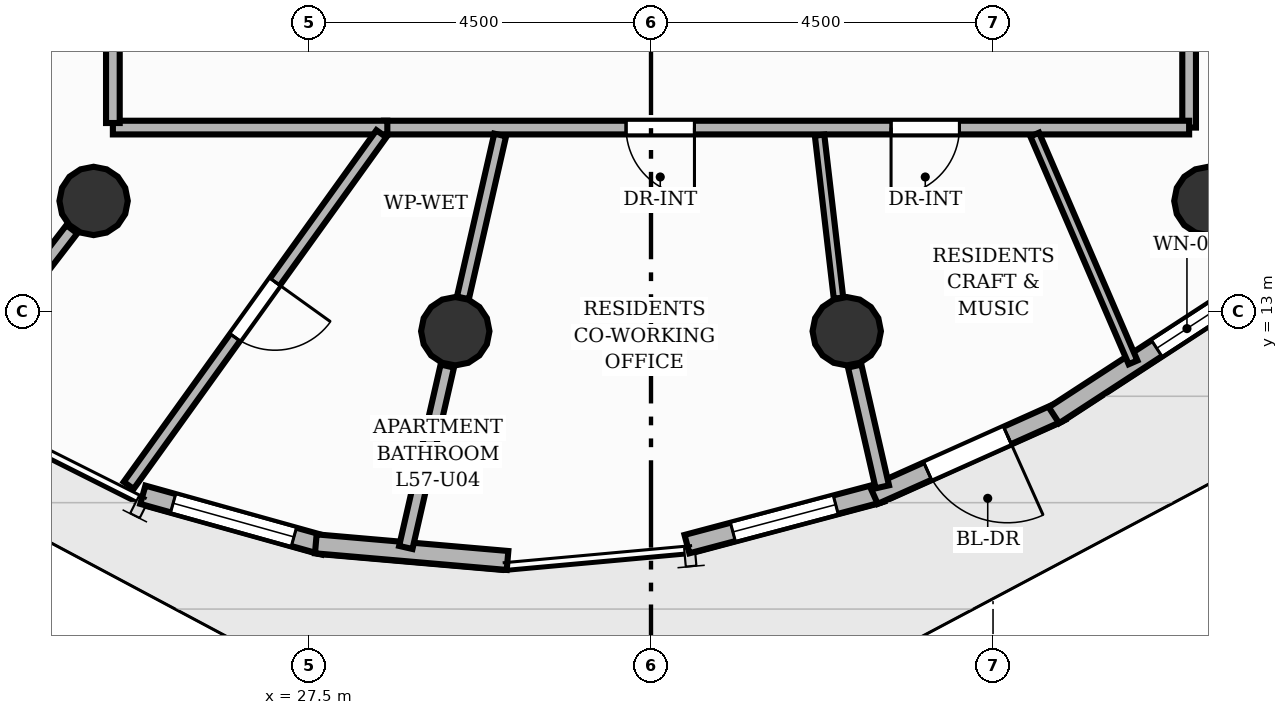
"""IFC4 building model, lengths in metres.
Left out: names, types, materials, properties, quantities, classifications, styles, units other than length and angle.
Written with IfcOpenShell. Run it as: python <this file> out.ifc"""

import sys

from ifc_helpers import new_model, si_unit, direction, frame, frame_2d, origin, origin_2d, place, context, subcontext, project, spatial, rectangle, circle, extrude, element, fill, save


model = new_model("IFC4")
c1 = context("Model", 3, precision=1e-05, world=origin(), true_north=direction((0.0, 1.0)))
c2 = subcontext(c1, "Body", "Model", "MODEL_VIEW")
j1 = project(units=[si_unit("LENGTHUNIT", "METRE"), si_unit("PLANEANGLEUNIT", "RADIAN")], contexts=[c1])
p1 = place(None, origin())
s1 = spatial("IfcSite", under=j1, at=p1, CompositionType="ELEMENT")
p2 = place(p1, origin())
s2 = spatial("IfcBuilding", under=s1, at=p2, CompositionType="ELEMENT")
p3 = place(p2, frame((0.0, 0.0, 191.84)))
s3 = spatial("IfcBuildingStorey", under=s2, at=p3, CompositionType="ELEMENT", Elevation=191.84)
for number, where, z_axis, x_axis in (
    (1, (24.667, 14.455, 0.0), (0.0, 0.0, 1.0), (1.0, 0.0, 0.0)),
    (2, (29.425, 12.74, 0.0), (0.0, 0.0, 1.0), (1.0, 0.0, 0.0)),
    (3, (34.575, 12.74, 0.0), (0.0, 0.0, 1.0), (1.0, 0.0, 0.0)),
    (4, (39.333, 14.455, 0.0), (0.0, 0.0, 1.0), (1.0, 0.0, 0.0)),
):
    element("IfcColumn", number, at=place(p3, frame(where, z_axis=z_axis, x_axis=x_axis)), inside=s3, PredefinedType="COLUMN", context=c2, shape_type="SweptSolid", body=[
        extrude(circle(Radius=0.45, at=origin_2d()), origin(), (0.0, 0.0, 1.0), 3.2),
    ])
p4 = place(p3, frame((27.701, 9.923, 0.0), z_axis=(0.0, 0.0, 1.0), x_axis=(-0.96316841201, 0.26889888454, 0.0)))
e5 = element("IfcWall", 5, at=p4, inside=s3, PredefinedType="SOLIDWALL", context=c2, shape_type="SweptSolid", body=[
    extrude(rectangle(XDim=2.478, YDim=0.25, at=frame_2d((1.239, 0.0))), origin(), (0.0, 0.0, 1.0), 2.96),
])
p5 = place(p4, frame((0.414, 0.0, 0.85)))
e6 = element("IfcOpeningElement", 6, at=p5, cuts=e5, PredefinedType="OPENING", context=c2, shape_type="SweptSolid", body=[
    extrude(rectangle(XDim=1.65, YDim=1.55, at=frame_2d((0.825, 0.775))), frame((0.0, 0.135, 0.0), z_axis=(0.0, -1.0, 0.0), x_axis=(1.0, 0.0, 0.0)), (0.0, 0.0, 1.0), 0.27),
])
p6 = place(p3, frame((30.112, 9.724, 0.0), z_axis=(0.0, 0.0, 1.0), x_axis=(-0.996260822813, 0.08639660252, 0.0)))
e7 = element("IfcWall", 7, at=p6, inside=s3, PredefinedType="SOLIDWALL", context=c2, shape_type="SweptSolid", body=[
    extrude(rectangle(XDim=2.532, YDim=0.25, at=frame_2d((1.266, 0.0))), origin(), (0.0, 0.0, 1.0), 2.96),
])
p7 = place(p3, frame((35.035, 10.619, 0.0), z_axis=(0.0, 0.0, 1.0), x_axis=(-0.96652474621, -0.256573410476, 0.0)))
e8 = element("IfcWall", 8, at=p7, inside=s3, PredefinedType="SOLIDWALL", context=c2, shape_type="SweptSolid", body=[
    extrude(rectangle(XDim=2.651, YDim=0.25, at=frame_2d((1.325, 0.0))), origin(), (0.0, 0.0, 1.0), 2.96),
])
p8 = place(p7, frame((0.626, 0.0, 0.85)))
e9 = element("IfcOpeningElement", 9, at=p8, cuts=e8, PredefinedType="OPENING", context=c2, shape_type="SweptSolid", body=[
    extrude(rectangle(XDim=1.4, YDim=1.55, at=frame_2d((0.7, 0.775))), frame((0.0, 0.135, 0.0), z_axis=(0.0, -1.0, 0.0), x_axis=(1.0, 0.0, 0.0)), (0.0, 0.0, 1.0), 0.27),
])
p9 = place(p3, frame((37.397, 11.687, 0.0), z_axis=(0.0, 0.0, 1.0), x_axis=(-0.912615139532, -0.408819773368, 0.0)))
e10 = element("IfcWall", 10, at=p9, inside=s3, PredefinedType="SOLIDWALL", context=c2, shape_type="SweptSolid", body=[
    extrude(rectangle(XDim=2.702, YDim=0.25, at=frame_2d((1.351, 0.0))), origin(), (0.0, 0.0, 1.0), 2.96),
])
p10 = place(p9, frame((0.776, 0.0, 0.0)))
e11 = element("IfcOpeningElement", 11, at=p10, cuts=e10, PredefinedType="OPENING", context=c2, shape_type="SweptSolid", body=[
    extrude(rectangle(XDim=1.15, YDim=2.2, at=frame_2d((0.575, 1.1))), frame((0.0, 0.135, 0.0), z_axis=(0.0, -1.0, 0.0), x_axis=(1.0, 0.0, 0.0)), (0.0, 0.0, 1.0), 0.27),
])
p11 = place(p3, frame((39.596, 13.13, 0.0), z_axis=(0.0, 0.0, 1.0), x_axis=(-0.837860586987, -0.545884270496, 0.0)))
e12 = element("IfcWall", 12, at=p11, inside=s3, PredefinedType="SOLIDWALL", context=c2, shape_type="SweptSolid", body=[
    extrude(rectangle(XDim=2.739, YDim=0.25, at=frame_2d((1.369, 0.0))), origin(), (0.0, 0.0, 1.0), 2.96),
])
p12 = place(p11, frame((0.175, 0.0, 0.85)))
e13 = element("IfcOpeningElement", 13, at=p12, cuts=e12, PredefinedType="OPENING", context=c2, shape_type="SweptSolid", body=[
    extrude(rectangle(XDim=0.95, YDim=1.45, at=frame_2d((0.475, 0.725))), frame((0.0, 0.135, 0.0), z_axis=(0.0, -1.0, 0.0), x_axis=(1.0, 0.0, 0.0)), (0.0, 0.0, 1.0), 0.27),
])
p13 = place(p3, frame((24.38, 14.082, 0.0), z_axis=(0.0, 0.0, 1.0), x_axis=(-0.609249164273, -0.792978849549, 0.0)))
e14 = element("IfcWall", 14, at=p13, inside=s3, PredefinedType="PARTITIONING", context=c2, shape_type="SweptSolid", body=[
    extrude(rectangle(XDim=2.557, YDim=0.18, at=frame_2d((1.278, 0.0))), origin(), (0.0, 0.0, 1.0), 2.403),
])
p14 = place(p3, frame((29.32, 12.282, 0.0), z_axis=(0.0, 0.0, 1.0), x_axis=(-0.222943921747, -0.974831271429, 0.0)))
e15 = element("IfcWall", 15, at=p14, inside=s3, PredefinedType="PARTITIONING", context=c2, shape_type="SweptSolid", body=[
    extrude(rectangle(XDim=2.448, YDim=0.18, at=frame_2d((1.224, 0.0))), origin(), (0.0, 0.0, 1.0), 2.403),
])
p15 = place(p3, frame((34.68, 12.282, 0.0), z_axis=(0.0, 0.0, 1.0), x_axis=(0.222967107114, -0.974825968645, 0.0)))
e16 = element("IfcWall", 16, at=p15, inside=s3, PredefinedType="PARTITIONING", context=c2, shape_type="SweptSolid", body=[
    extrude(rectangle(XDim=1.63, YDim=0.18, at=frame_2d((0.815, 0.0))), origin(), (0.0, 0.0, 1.0), 2.403),
])
p16 = place(p3, frame((39.08, 24.526, 0.0), z_axis=(0.0, 0.0, 1.0), x_axis=(0.0, -1.0, 0.0)))
e17 = element("IfcWall", 17, at=p16, inside=s3, PredefinedType="PARTITIONING", context=c2, shape_type="SweptSolid", body=[
    extrude(rectangle(XDim=9.106, YDim=0.18, at=frame_2d((4.553, 0.0))), origin(), (0.0, 0.0, 1.0), 2.955),
])
p17 = place(p16, frame((1.184, 0.0, 0.0)))
e18 = element("IfcOpeningElement", 18, at=p17, cuts=e17, PredefinedType="OPENING", context=c2, shape_type="SweptSolid", body=[
    extrude(rectangle(XDim=0.9, YDim=2.1, at=frame_2d((0.45, 1.05))), frame((0.0, 0.1, 0.0), z_axis=(0.0, -1.0, 0.0), x_axis=(1.0, 0.0, 0.0)), (0.0, 0.0, 1.0), 0.2),
])
p18 = place(p16, frame((5.716, 0.0, 0.0)))
e19 = element("IfcOpeningElement", 19, at=p18, cuts=e17, PredefinedType="OPENING", context=c2, shape_type="SweptSolid", body=[
    extrude(rectangle(XDim=0.9, YDim=2.1, at=frame_2d((0.45, 1.05))), frame((0.0, 0.1, 0.0), z_axis=(0.0, -1.0, 0.0), x_axis=(1.0, 0.0, 0.0)), (0.0, 0.0, 1.0), 0.2),
])
p19 = place(p3, frame((39.08, 15.42, 0.0), z_axis=(0.0, 0.0, 1.0), x_axis=(-1.0, 0.0, 0.0)))
e20 = element("IfcWall", 20, at=p19, inside=s3, PredefinedType="PARTITIONING", context=c2, shape_type="SweptSolid", body=[
    extrude(rectangle(XDim=10.594, YDim=0.18, at=frame_2d((5.297, 0.0))), origin(), (0.0, 0.0, 1.0), 2.955),
])
p20 = place(p19, frame((3.021, 0.0, 0.0)))
e21 = element("IfcOpeningElement", 21, at=p20, cuts=e20, PredefinedType="OPENING", context=c2, shape_type="SweptSolid", body=[
    extrude(rectangle(XDim=0.9, YDim=2.1, at=frame_2d((0.45, 1.05))), frame((0.0, 0.1, 0.0), z_axis=(0.0, -1.0, 0.0), x_axis=(1.0, 0.0, 0.0)), (0.0, 0.0, 1.0), 0.2),
])
p21 = place(p19, frame((6.508, 0.0, 0.0)))
e22 = element("IfcOpeningElement", 22, at=p21, cuts=e20, PredefinedType="OPENING", context=c2, shape_type="SweptSolid", body=[
    extrude(rectangle(XDim=0.9, YDim=2.1, at=frame_2d((0.45, 1.05))), frame((0.0, 0.1, 0.0), z_axis=(0.0, -1.0, 0.0), x_axis=(1.0, 0.0, 0.0)), (0.0, 0.0, 1.0), 0.2),
])
p22 = place(p3, frame((28.531, 15.42, 0.0), z_axis=(0.0, 0.0, 1.0), x_axis=(-1.0, 0.0, 0.0)))
e23 = element("IfcWall", 23, at=p22, inside=s3, PredefinedType="PARTITIONING", context=c2, shape_type="SweptSolid", body=[
    extrude(rectangle(XDim=3.611, YDim=0.18, at=frame_2d((1.805, 0.0))), origin(), (0.0, 0.0, 1.0), 2.955),
])
p23 = place(p3, frame((24.92, 15.48, 0.0), z_axis=(0.0, 0.0, 1.0), x_axis=(0.0, 1.0, 0.0)))
e24 = element("IfcWall", 24, at=p23, inside=s3, PredefinedType="PARTITIONING", context=c2, shape_type="SweptSolid", body=[
    extrude(rectangle(XDim=3.946, YDim=0.18, at=frame_2d((1.973, 0.0))), origin(), (0.0, 0.0, 1.0), 2.955),
])
p24 = place(p23, frame((1.448, 0.0, 0.0)))
e25 = element("IfcOpeningElement", 25, at=p24, cuts=e24, PredefinedType="OPENING", context=c2, shape_type="SweptSolid", body=[
    extrude(rectangle(XDim=1.05, YDim=2.15, at=frame_2d((0.525, 1.075))), frame((0.0, 0.1, 0.0), z_axis=(0.0, -1.0, 0.0), x_axis=(1.0, 0.0, 0.0)), (0.0, 0.0, 1.0), 0.2),
])
p25 = place(p3, frame((38.342, 12.331, 0.0), z_axis=(0.0, 0.0, 1.0), x_axis=(-0.396192482216, 0.918167477662, 0.0)))
e26 = element("IfcWall", 26, at=p25, inside=s3, PredefinedType="PARTITIONING", context=c2, shape_type="SweptSolid", body=[
    extrude(rectangle(XDim=3.265, YDim=0.125, at=frame_2d((1.632, 0.0))), origin(), (0.0, 0.0, 1.0), 2.692),
])
p26 = place(p3, frame((34.467, 13.176, 0.0), z_axis=(0.0, 0.0, 1.0), x_axis=(-0.115430815868, 0.993315522253, 0.0)))
e27 = element("IfcWall", 27, at=p26, inside=s3, PredefinedType="PARTITIONING", context=c2, shape_type="SweptSolid", body=[
    extrude(rectangle(XDim=2.159, YDim=0.125, at=frame_2d((1.08, 0.0))), origin(), (0.0, 0.0, 1.0), 2.403),
])
p27 = place(p3, frame((29.525, 13.179, 0.0), z_axis=(0.0, 0.0, 1.0), x_axis=(0.222969522248, 0.974825416241, 0.0)))
e28 = element("IfcWall", 28, at=p27, inside=s3, PredefinedType="PLUMBINGWALL", context=c2, shape_type="SweptSolid", body=[
    extrude(rectangle(XDim=2.199, YDim=0.16, at=frame_2d((1.099, 0.0))), origin(), (0.0, 0.0, 1.0), 2.403),
])
p28 = place(p3, frame((28.452, 15.339, 0.0), z_axis=(0.0, 0.0, 1.0), x_axis=(-0.583489481732, -0.812120695899, 0.0)))
e29 = element("IfcWall", 29, at=p28, inside=s3, PredefinedType="PLUMBINGWALL", context=c2, shape_type="SweptSolid", body=[
    extrude(rectangle(XDim=5.698, YDim=0.16, at=frame_2d((2.849, 0.0))), origin(), (0.0, 0.0, 1.0), 2.692),
])
p29 = place(p28, frame((2.399, 0.0, 0.0)))
e30 = element("IfcOpeningElement", 30, at=p29, cuts=e29, PredefinedType="OPENING", context=c2, shape_type="SweptSolid", body=[
    extrude(rectangle(XDim=0.9, YDim=2.1, at=frame_2d((0.45, 1.05))), frame((0.0, 0.09, 0.0), z_axis=(0.0, -1.0, 0.0), x_axis=(1.0, 0.0, 0.0)), (0.0, 0.0, 1.0), 0.18),
])
p30 = place(p3, frame((19.422, 15.838, 0.0), z_axis=(0.0, 0.0, 1.0), x_axis=(0.838876327826, 0.544322061479, 0.0)))
e31 = element("IfcWall", 31, at=p30, inside=s3, PredefinedType="PARTITIONING", context=c2, shape_type="SweptSolid", body=[
    extrude(rectangle(XDim=6.454, YDim=0.125, at=frame_2d((3.227, 0.0))), origin(), (0.0, 0.0, 1.0), 2.955),
])
p31 = place(p30, frame((4.419, 0.0, 0.0)))
e32 = element("IfcOpeningElement", 32, at=p31, cuts=e31, PredefinedType="OPENING", context=c2, shape_type="SweptSolid", body=[
    extrude(rectangle(XDim=0.9, YDim=2.1, at=frame_2d((0.45, 1.05))), frame((0.0, 0.073, 0.0), z_axis=(0.0, -1.0, 0.0), x_axis=(1.0, 0.0, 0.0)), (0.0, 0.0, 1.0), 0.145),
])
p32 = place(p10, origin())
e33 = element("IfcDoor", 33, at=p32, inside=s3, OperationType="SINGLE_SWING_LEFT", PredefinedType="DOOR", context=c2, shape_type="SweptSolid", body=[
    extrude(rectangle(XDim=1.15, YDim=2.2, at=frame_2d((0.575, 1.1))), frame((0.0, 0.025, 0.0), z_axis=(0.0, -1.0, 0.0), x_axis=(1.0, 0.0, 0.0)), (0.0, 0.0, 1.0), 0.05),
])
fill(e11, e33)
p33 = place(p5, origin())
e34 = element("IfcWindow", 34, at=p33, inside=s3, PartitioningType="SINGLE_PANEL", PredefinedType="WINDOW", context=c2, shape_type="SweptSolid", body=[
    extrude(rectangle(XDim=1.65, YDim=1.55, at=frame_2d((0.825, 0.775))), frame((0.0, 0.03, 0.0), z_axis=(0.0, -1.0, 0.0), x_axis=(1.0, 0.0, 0.0)), (0.0, 0.0, 1.0), 0.06),
])
fill(e6, e34)
p34 = place(p8, origin())
e35 = element("IfcWindow", 35, at=p34, inside=s3, PartitioningType="SINGLE_PANEL", PredefinedType="WINDOW", context=c2, shape_type="SweptSolid", body=[
    extrude(rectangle(XDim=1.4, YDim=1.55, at=frame_2d((0.7, 0.775))), frame((0.0, 0.03, 0.0), z_axis=(0.0, -1.0, 0.0), x_axis=(1.0, 0.0, 0.0)), (0.0, 0.0, 1.0), 0.06),
])
fill(e9, e35)
p35 = place(p12, origin())
e36 = element("IfcWindow", 36, at=p35, inside=s3, PartitioningType="SINGLE_PANEL", PredefinedType="WINDOW", context=c2, shape_type="SweptSolid", body=[
    extrude(rectangle(XDim=0.95, YDim=1.45, at=frame_2d((0.475, 0.725))), frame((0.0, 0.03, 0.0), z_axis=(0.0, -1.0, 0.0), x_axis=(1.0, 0.0, 0.0)), (0.0, 0.0, 1.0), 0.06),
])
fill(e13, e36)
p36 = place(p20, origin())
e37 = element("IfcDoor", 37, at=p36, inside=s3, OperationType="SINGLE_SWING_RIGHT", PredefinedType="DOOR", context=c2, shape_type="SweptSolid", body=[
    extrude(rectangle(XDim=0.9, YDim=2.1, at=frame_2d((0.45, 1.05))), frame((0.0, 0.025, 0.0), z_axis=(0.0, -1.0, 0.0), x_axis=(1.0, 0.0, 0.0)), (0.0, 0.0, 1.0), 0.05),
])
fill(e21, e37)
p37 = place(p21, origin())
e38 = element("IfcDoor", 38, at=p37, inside=s3, OperationType="SINGLE_SWING_LEFT", PredefinedType="DOOR", context=c2, shape_type="SweptSolid", body=[
    extrude(rectangle(XDim=0.9, YDim=2.1, at=frame_2d((0.45, 1.05))), frame((0.0, 0.025, 0.0), z_axis=(0.0, -1.0, 0.0), x_axis=(1.0, 0.0, 0.0)), (0.0, 0.0, 1.0), 0.05),
])
fill(e22, e38)
p38 = place(p29, origin())
e39 = element("IfcDoor", 39, at=p38, inside=s3, OperationType="SINGLE_SWING_LEFT", PredefinedType="DOOR", context=c2, shape_type="SweptSolid", body=[
    extrude(rectangle(XDim=0.9, YDim=2.1, at=frame_2d((0.45, 1.05))), frame((0.0, 0.025, 0.0), z_axis=(0.0, -1.0, 0.0), x_axis=(1.0, 0.0, 0.0)), (0.0, 0.0, 1.0), 0.05),
])
fill(e30, e39)
save(model, sys.argv[1])
